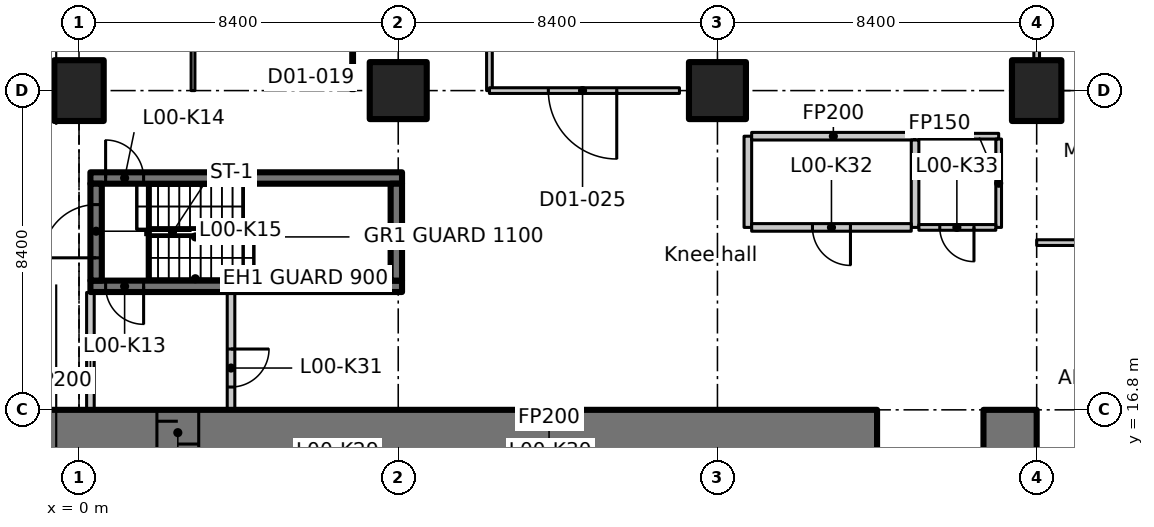
"""IFC4 building model, lengths in metres.
Left out: names, types, materials, properties, quantities, classifications, styles, units other than length and angle.
Written with IfcOpenShell. Run it as: python <this file> out.ifc"""

import sys

from ifc_helpers import new_model, si_unit, direction, frame, frame_2d, origin, origin_2d, place, context, subcontext, project, spatial, rectangle, extrude, element, fill, save


model = new_model("IFC4")
c1 = context("Model", 3, precision=1e-05, world=origin(), true_north=direction((0.0, 1.0)))
c2 = subcontext(c1, "Body", "Model", "MODEL_VIEW")
j1 = project(units=[si_unit("LENGTHUNIT", "METRE"), si_unit("PLANEANGLEUNIT", "RADIAN")], contexts=[c1])
p1 = place(None, origin())
s1 = spatial("IfcSite", under=j1, at=p1, CompositionType="ELEMENT")
p2 = place(p1, origin())
s2 = spatial("IfcBuilding", under=s1, at=p2, CompositionType="ELEMENT")
p3 = place(p2, origin())
s3 = spatial("IfcBuildingStorey", under=s2, at=p3, CompositionType="ELEMENT", Elevation=0.0)
p4 = place(p3, frame((0.0, 25.2, 0.0), z_axis=(0.0, 0.0, 1.0), x_axis=(1.0, 0.0, 0.0)))
e1 = element("IfcColumn", 1, at=p4, inside=s3, PredefinedType="COLUMN", context=c2, shape_type="SweptSolid", body=[
    extrude(rectangle(XDim=1.3, YDim=1.6, at=origin_2d()), origin(), (0.0, 0.0, 1.0), 6.75),
])
for number, where, z_axis, x_axis in (
    (2, (8.4, 25.2, 0.0), (0.0, 0.0, 1.0), (1.0, 0.0, 0.0)),
    (3, (16.8, 25.2, 0.0), (0.0, 0.0, 1.0), (1.0, 0.0, 0.0)),
):
    element("IfcColumn", number, at=place(p3, frame(where, z_axis=z_axis, x_axis=x_axis)), inside=s3, PredefinedType="COLUMN", context=c2, shape_type="SweptSolid", body=[
        extrude(rectangle(XDim=1.5, YDim=1.5, at=origin_2d()), origin(), (0.0, 0.0, 1.0), 6.75),
    ])
p5 = place(p3, frame((25.2, 25.2, 0.0), z_axis=(0.0, 0.0, 1.0), x_axis=(1.0, 0.0, 0.0)))
e4 = element("IfcColumn", 4, at=p5, inside=s3, PredefinedType="COLUMN", context=c2, shape_type="SweptSolid", body=[
    extrude(rectangle(XDim=1.3, YDim=1.6, at=origin_2d()), origin(), (0.0, 0.0, 1.0), 6.75),
])
p6 = place(p3, frame((-1.1, 16.2, 0.0), z_axis=(0.0, 0.0, 1.0), x_axis=(1.0, 0.0, 0.0)))
e5 = element("IfcWall", 5, at=p6, inside=s3, PredefinedType="SHEAR", context=c2, shape_type="SweptSolid", body=[
    extrude(rectangle(XDim=22.1, YDim=1.2, at=frame_2d((11.05, 0.0))), origin(), (0.0, 0.0, 1.0), 6.75),
])
p7 = place(p6, frame((3.15, 0.0, 0.0)))
e6 = element("IfcOpeningElement", 6, at=p7, cuts=e5, PredefinedType="OPENING", context=c2, shape_type="SweptSolid", body=[
    extrude(rectangle(XDim=1.1, YDim=2.3, at=frame_2d((0.55, 1.15))), frame((0.0, 0.61, 0.0), z_axis=(0.0, -1.0, 0.0), x_axis=(1.0, 0.0, 0.0)), (0.0, 0.0, 1.0), 1.22),
])
p8 = place(p3, frame((23.8, 16.2, 0.0), z_axis=(0.0, 0.0, 1.0), x_axis=(1.0, 0.0, 0.0)))
e7 = element("IfcWall", 7, at=p8, inside=s3, PredefinedType="SHEAR", context=c2, shape_type="SweptSolid", body=[
    extrude(rectangle(XDim=1.4, YDim=1.2, at=frame_2d((0.7, 0.0))), origin(), (0.0, 0.0, 1.0), 6.75),
])
p9 = place(p3, frame((8.5, 20.05, 0.0), z_axis=(0.0, 0.0, 1.0), x_axis=(-1.0, 0.0, 0.0)))
e8 = element("IfcWall", 8, at=p9, inside=s3, PredefinedType="SHEAR", context=c2, shape_type="SweptSolid", body=[
    extrude(rectangle(XDim=8.2, YDim=0.3, at=frame_2d((4.1, 0.0))), origin(), (0.0, 0.0, 1.0), 6.75),
])
p10 = place(p9, frame((6.8, 0.0, 0.0)))
e9 = element("IfcOpeningElement", 9, at=p10, cuts=e8, PredefinedType="OPENING", context=c2, shape_type="SweptSolid", body=[
    extrude(rectangle(XDim=1.0, YDim=2.1, at=frame_2d((0.5, 1.05))), frame((0.0, 0.16, 0.0), z_axis=(0.0, -1.0, 0.0), x_axis=(1.0, 0.0, 0.0)), (0.0, 0.0, 1.0), 0.32),
])
p11 = place(p3, frame((0.3, 22.9, 0.0), z_axis=(0.0, 0.0, 1.0), x_axis=(1.0, 0.0, 0.0)))
e10 = element("IfcWall", 10, at=p11, inside=s3, PredefinedType="SHEAR", context=c2, shape_type="SweptSolid", body=[
    extrude(rectangle(XDim=8.2, YDim=0.3, at=frame_2d((4.1, 0.0))), origin(), (0.0, 0.0, 1.0), 6.75),
])
p12 = place(p11, frame((0.4, 0.0, 0.0)))
e11 = element("IfcOpeningElement", 11, at=p12, cuts=e10, PredefinedType="OPENING", context=c2, shape_type="SweptSolid", body=[
    extrude(rectangle(XDim=1.0, YDim=2.1, at=frame_2d((0.5, 1.05))), frame((0.0, 0.16, 0.0), z_axis=(0.0, -1.0, 0.0), x_axis=(1.0, 0.0, 0.0)), (0.0, 0.0, 1.0), 0.32),
])
p13 = place(p3, frame((0.45, 20.2, 0.0), z_axis=(0.0, 0.0, 1.0), x_axis=(0.0, 1.0, 0.0)))
e12 = element("IfcWall", 12, at=p13, inside=s3, PredefinedType="SHEAR", context=c2, shape_type="SweptSolid", body=[
    extrude(rectangle(XDim=2.55, YDim=0.3, at=frame_2d((1.275, 0.0))), origin(), (0.0, 0.0, 1.0), 6.75),
])
p14 = place(p13, frame((0.6, 0.0, 0.0)))
e13 = element("IfcOpeningElement", 13, at=p14, cuts=e12, PredefinedType="OPENING", context=c2, shape_type="SweptSolid", body=[
    extrude(rectangle(XDim=1.4, YDim=2.1, at=frame_2d((0.7, 1.05))), frame((0.0, 0.16, 0.0), z_axis=(0.0, -1.0, 0.0), x_axis=(1.0, 0.0, 0.0)), (0.0, 0.0, 1.0), 0.32),
])
p15 = place(p3, frame((8.35, 20.2, 0.0), z_axis=(0.0, 0.0, 1.0), x_axis=(0.0, 1.0, 0.0)))
e14 = element("IfcWall", 14, at=p15, inside=s3, PredefinedType="SHEAR", context=c2, shape_type="SweptSolid", body=[
    extrude(rectangle(XDim=2.55, YDim=0.3, at=frame_2d((1.275, 0.0))), origin(), (0.0, 0.0, 1.0), 6.75),
])
p16 = place(p3, frame((0.3, 16.812, 0.0), z_axis=(0.0, 0.0, 1.0), x_axis=(0.0, 1.0, 0.0)))
e15 = element("IfcWall", 15, at=p16, inside=s3, PredefinedType="PARTITIONING", context=c2, shape_type="SweptSolid", body=[
    extrude(rectangle(XDim=3.076, YDim=0.2, at=frame_2d((1.538, 0.0))), origin(), (0.0, 0.0, 1.0), 6.38),
])
p17 = place(p3, frame((4.0, 19.888, 0.0), z_axis=(0.0, 0.0, 1.0), x_axis=(0.0, -1.0, 0.0)))
e16 = element("IfcWall", 16, at=p17, inside=s3, PredefinedType="PARTITIONING", context=c2, shape_type="SweptSolid", body=[
    extrude(rectangle(XDim=3.076, YDim=0.2, at=frame_2d((1.538, 0.0))), origin(), (0.0, 0.0, 1.0), 6.75),
])
p18 = place(p17, frame((1.488, 0.0, 0.0)))
e17 = element("IfcOpeningElement", 17, at=p18, cuts=e16, PredefinedType="OPENING", context=c2, shape_type="SweptSolid", body=[
    extrude(rectangle(XDim=1.0, YDim=2.1, at=frame_2d((0.5, 1.05))), frame((0.0, 0.11, 0.0), z_axis=(0.0, -1.0, 0.0), x_axis=(1.0, 0.0, 0.0)), (0.0, 0.0, 1.0), 0.22),
])
p19 = place(p3, frame((17.6, 21.6, 0.0), z_axis=(0.0, 0.0, 1.0), x_axis=(0.0, 1.0, 0.0)))
e18 = element("IfcWall", 18, at=p19, inside=s3, PredefinedType="PARTITIONING", context=c2, shape_type="SweptSolid", body=[
    extrude(rectangle(XDim=2.4, YDim=0.2, at=frame_2d((1.2, 0.0))), origin(), (0.0, 0.0, 1.0), 6.75),
])
p20 = place(p3, frame((17.7, 24.0, 0.0), z_axis=(0.0, 0.0, 1.0), x_axis=(1.0, 0.0, 0.0)))
e19 = element("IfcWall", 19, at=p20, inside=s3, PredefinedType="PARTITIONING", context=c2, shape_type="SweptSolid", body=[
    extrude(rectangle(XDim=4.3, YDim=0.2, at=frame_2d((2.15, 0.0))), origin(), (0.0, 0.0, 1.0), 6.75),
])
p21 = place(p3, frame((22.0, 23.9, 0.0), z_axis=(0.0, 0.0, 1.0), x_axis=(0.0, -1.0, 0.0)))
e20 = element("IfcWall", 20, at=p21, inside=s3, PredefinedType="PARTITIONING", context=c2, shape_type="SweptSolid", body=[
    extrude(rectangle(XDim=2.3, YDim=0.2, at=frame_2d((1.15, 0.0))), origin(), (0.0, 0.0, 1.0), 6.75),
])
p22 = place(p3, frame((21.9, 21.6, 0.0), z_axis=(0.0, 0.0, 1.0), x_axis=(-1.0, 0.0, 0.0)))
e21 = element("IfcWall", 21, at=p22, inside=s3, PredefinedType="PARTITIONING", context=c2, shape_type="SweptSolid", body=[
    extrude(rectangle(XDim=4.2, YDim=0.2, at=frame_2d((2.1, 0.0))), origin(), (0.0, 0.0, 1.0), 6.75),
])
p23 = place(p22, frame((1.6, 0.0, 0.0)))
e22 = element("IfcOpeningElement", 22, at=p23, cuts=e21, PredefinedType="OPENING", context=c2, shape_type="SweptSolid", body=[
    extrude(rectangle(XDim=1.0, YDim=2.1, at=frame_2d((0.5, 1.05))), frame((0.0, 0.11, 0.0), z_axis=(0.0, -1.0, 0.0), x_axis=(1.0, 0.0, 0.0)), (0.0, 0.0, 1.0), 0.22),
])
p24 = place(p3, frame((22.1, 24.0, 0.0), z_axis=(0.0, 0.0, 1.0), x_axis=(1.0, 0.0, 0.0)))
e23 = element("IfcWall", 23, at=p24, inside=s3, PredefinedType="PARTITIONING", context=c2, shape_type="SweptSolid", body=[
    extrude(rectangle(XDim=2.1, YDim=0.15, at=frame_2d((1.05, 0.0))), origin(), (0.0, 0.0, 1.0), 6.75),
])
p25 = place(p3, frame((24.2, 23.925, 0.0), z_axis=(0.0, 0.0, 1.0), x_axis=(0.0, -1.0, 0.0)))
e24 = element("IfcWall", 24, at=p25, inside=s3, PredefinedType="PARTITIONING", context=c2, shape_type="SweptSolid", body=[
    extrude(rectangle(XDim=2.325, YDim=0.15, at=frame_2d((1.163, 0.0))), origin(), (0.0, 0.0, 1.0), 6.75),
])
p26 = place(p3, frame((24.125, 21.6, 0.0), z_axis=(0.0, 0.0, 1.0), x_axis=(-1.0, 0.0, 0.0)))
e25 = element("IfcWall", 25, at=p26, inside=s3, PredefinedType="PARTITIONING", context=c2, shape_type="SweptSolid", body=[
    extrude(rectangle(XDim=2.025, YDim=0.15, at=frame_2d((1.012, 0.0))), origin(), (0.0, 0.0, 1.0), 6.75),
])
p27 = place(p26, frame((0.575, 0.0, 0.0)))
e26 = element("IfcOpeningElement", 26, at=p27, cuts=e25, PredefinedType="OPENING", context=c2, shape_type="SweptSolid", body=[
    extrude(rectangle(XDim=0.9, YDim=2.1, at=frame_2d((0.45, 1.05))), frame((0.0, 0.085, 0.0), z_axis=(0.0, -1.0, 0.0), x_axis=(1.0, 0.0, 0.0)), (0.0, 0.0, 1.0), 0.17),
])
p28 = place(p3, frame((25.2, 21.2, 0.0), z_axis=(0.0, 0.0, 1.0), x_axis=(1.0, 0.0, 0.0)))
e27 = element("IfcWall", 27, at=p28, inside=s3, PredefinedType="PARTITIONING", context=c2, shape_type="SweptSolid", body=[
    extrude(rectangle(XDim=4.2, YDim=0.15, at=frame_2d((2.1, 0.0))), origin(), (0.0, 0.0, 1.0), 6.73),
])
p29 = place(p3, frame((25.2, 31.0, 0.0), z_axis=(0.0, 0.0, 1.0), x_axis=(0.0, -1.0, 0.0)))
e28 = element("IfcWall", 28, at=p29, inside=s3, PredefinedType="PARTITIONING", context=c2, shape_type="SweptSolid", body=[
    extrude(rectangle(XDim=4.98, YDim=0.15, at=frame_2d((2.49, 0.0))), origin(), (0.0, 0.0, 1.0), 6.73),
])
p30 = place(p29, frame((2.08, 0.0, 0.0)))
e29 = element("IfcOpeningElement", 29, at=p30, cuts=e28, PredefinedType="OPENING", context=c2, shape_type="SweptSolid", body=[
    extrude(rectangle(XDim=1.1, YDim=2.1, at=frame_2d((0.55, 1.05))), frame((0.0, 0.085, 0.0), z_axis=(0.0, -1.0, 0.0), x_axis=(1.0, 0.0, 0.0)), (0.0, 0.0, 1.0), 0.17),
])
p31 = place(p3, frame((10.8, 25.2, 0.0), z_axis=(0.0, 0.0, 1.0), x_axis=(0.0, 1.0, 0.0)))
e30 = element("IfcWall", 30, at=p31, inside=s3, PredefinedType="PARTITIONING", context=c2, shape_type="SweptSolid", body=[
    extrude(rectangle(XDim=4.2, YDim=0.15, at=frame_2d((2.1, 0.0))), origin(), (0.0, 0.0, 1.0), 6.73),
])
p32 = place(p3, frame((3.0, 29.4, 0.0), z_axis=(0.0, 0.0, 1.0), x_axis=(0.0, -1.0, 0.0)))
e31 = element("IfcWall", 31, at=p32, inside=s3, PredefinedType="PARTITIONING", context=c2, shape_type="SweptSolid", body=[
    extrude(rectangle(XDim=4.2, YDim=0.1, at=frame_2d((2.1, 0.0))), origin(), (0.0, 0.0, 1.0), 6.73),
])
p33 = place(p3, frame((7.2, 29.4, 0.0), z_axis=(0.0, 0.0, 1.0), x_axis=(0.0, -1.0, 0.0)))
e32 = element("IfcWall", 32, at=p33, inside=s3, PredefinedType="PARTITIONING", context=c2, shape_type="SweptSolid", body=[
    extrude(rectangle(XDim=4.2, YDim=0.1, at=frame_2d((2.1, 0.0))), origin(), (0.0, 0.0, 1.0), 6.73),
])
p34 = place(p33, frame((1.5, 0.0, 0.0)))
e33 = element("IfcOpeningElement", 33, at=p34, cuts=e32, PredefinedType="OPENING", context=c2, shape_type="SweptSolid", body=[
    extrude(rectangle(XDim=0.9, YDim=2.1, at=frame_2d((0.45, 1.05))), frame((0.0, 0.06, 0.0), z_axis=(0.0, -1.0, 0.0), x_axis=(1.0, 0.0, 0.0)), (0.0, 0.0, 1.0), 0.12),
])
p35 = place(p3, frame((15.8, 25.2, 0.0), z_axis=(0.0, 0.0, 1.0), x_axis=(-1.0, 0.0, 0.0)))
e34 = element("IfcWall", 34, at=p35, inside=s3, PredefinedType="PARTITIONING", context=c2, shape_type="SweptSolid", body=[
    extrude(rectangle(XDim=5.0, YDim=0.15, at=frame_2d((2.5, 0.0))), origin(), (0.0, 0.0, 1.0), 6.73),
])
p36 = place(p35, frame((1.65, 0.0, 0.0)))
e35 = element("IfcOpeningElement", 35, at=p36, cuts=e34, PredefinedType="OPENING", context=c2, shape_type="SweptSolid", body=[
    extrude(rectangle(XDim=1.8, YDim=2.1, at=frame_2d((0.9, 1.05))), frame((0.0, 0.085, 0.0), z_axis=(0.0, -1.0, 0.0), x_axis=(1.0, 0.0, 0.0)), (0.0, 0.0, 1.0), 0.17),
])
p37 = place(p7, origin())
e36 = element("IfcDoor", 36, at=p37, inside=s3, OperationType="SLIDING_TO_LEFT", PredefinedType="DOOR", context=c2, shape_type="SweptSolid", body=[
    extrude(rectangle(XDim=1.1, YDim=2.3, at=frame_2d((0.55, 1.15))), frame((0.0, 0.025, 0.0), z_axis=(0.0, -1.0, 0.0), x_axis=(1.0, 0.0, 0.0)), (0.0, 0.0, 1.0), 0.05),
])
fill(e6, e36)
p38 = place(p10, origin())
e37 = element("IfcDoor", 37, at=p38, inside=s3, OperationType="SINGLE_SWING_RIGHT", PredefinedType="DOOR", context=c2, shape_type="SweptSolid", body=[
    extrude(rectangle(XDim=1.0, YDim=2.1, at=frame_2d((0.5, 1.05))), frame((0.0, 0.025, 0.0), z_axis=(0.0, -1.0, 0.0), x_axis=(1.0, 0.0, 0.0)), (0.0, 0.0, 1.0), 0.05),
])
fill(e9, e37)
p39 = place(p12, origin())
e38 = element("IfcDoor", 38, at=p39, inside=s3, OperationType="SINGLE_SWING_LEFT", PredefinedType="DOOR", context=c2, shape_type="SweptSolid", body=[
    extrude(rectangle(XDim=1.0, YDim=2.1, at=frame_2d((0.5, 1.05))), frame((0.0, 0.025, 0.0), z_axis=(0.0, -1.0, 0.0), x_axis=(1.0, 0.0, 0.0)), (0.0, 0.0, 1.0), 0.05),
])
fill(e11, e38)
p40 = place(p14, origin())
e39 = element("IfcDoor", 39, at=p40, inside=s3, OperationType="SINGLE_SWING_RIGHT", PredefinedType="DOOR", context=c2, shape_type="SweptSolid", body=[
    extrude(rectangle(XDim=1.4, YDim=2.1, at=frame_2d((0.7, 1.05))), frame((0.0, 0.025, 0.0), z_axis=(0.0, -1.0, 0.0), x_axis=(1.0, 0.0, 0.0)), (0.0, 0.0, 1.0), 0.05),
])
fill(e13, e39)
p41 = place(p18, origin())
e40 = element("IfcDoor", 40, at=p41, inside=s3, OperationType="SINGLE_SWING_RIGHT", PredefinedType="DOOR", context=c2, shape_type="SweptSolid", body=[
    extrude(rectangle(XDim=1.0, YDim=2.1, at=frame_2d((0.5, 1.05))), frame((0.0, 0.025, 0.0), z_axis=(0.0, -1.0, 0.0), x_axis=(1.0, 0.0, 0.0)), (0.0, 0.0, 1.0), 0.05),
])
fill(e17, e40)
p42 = place(p23, origin())
e41 = element("IfcDoor", 41, at=p42, inside=s3, OperationType="SINGLE_SWING_LEFT", PredefinedType="DOOR", context=c2, shape_type="SweptSolid", body=[
    extrude(rectangle(XDim=1.0, YDim=2.1, at=frame_2d((0.5, 1.05))), frame((0.0, 0.025, 0.0), z_axis=(0.0, -1.0, 0.0), x_axis=(1.0, 0.0, 0.0)), (0.0, 0.0, 1.0), 0.05),
])
fill(e22, e41)
p43 = place(p27, origin())
e42 = element("IfcDoor", 42, at=p43, inside=s3, OperationType="SINGLE_SWING_RIGHT", PredefinedType="DOOR", context=c2, shape_type="SweptSolid", body=[
    extrude(rectangle(XDim=0.9, YDim=2.1, at=frame_2d((0.45, 1.05))), frame((0.0, 0.025, 0.0), z_axis=(0.0, -1.0, 0.0), x_axis=(1.0, 0.0, 0.0)), (0.0, 0.0, 1.0), 0.05),
])
fill(e26, e42)
p44 = place(p36, origin())
e43 = element("IfcDoor", 43, at=p44, inside=s3, OperationType="DOUBLE_DOOR_SINGLE_SWING", PredefinedType="DOOR", context=c2, shape_type="SweptSolid", body=[
    extrude(rectangle(XDim=1.8, YDim=2.1, at=frame_2d((0.9, 1.05))), frame((0.0, 0.025, 0.0), z_axis=(0.0, -1.0, 0.0), x_axis=(1.0, 0.0, 0.0)), (0.0, 0.0, 1.0), 0.05),
])
fill(e35, e43)
save(model, sys.argv[1])
